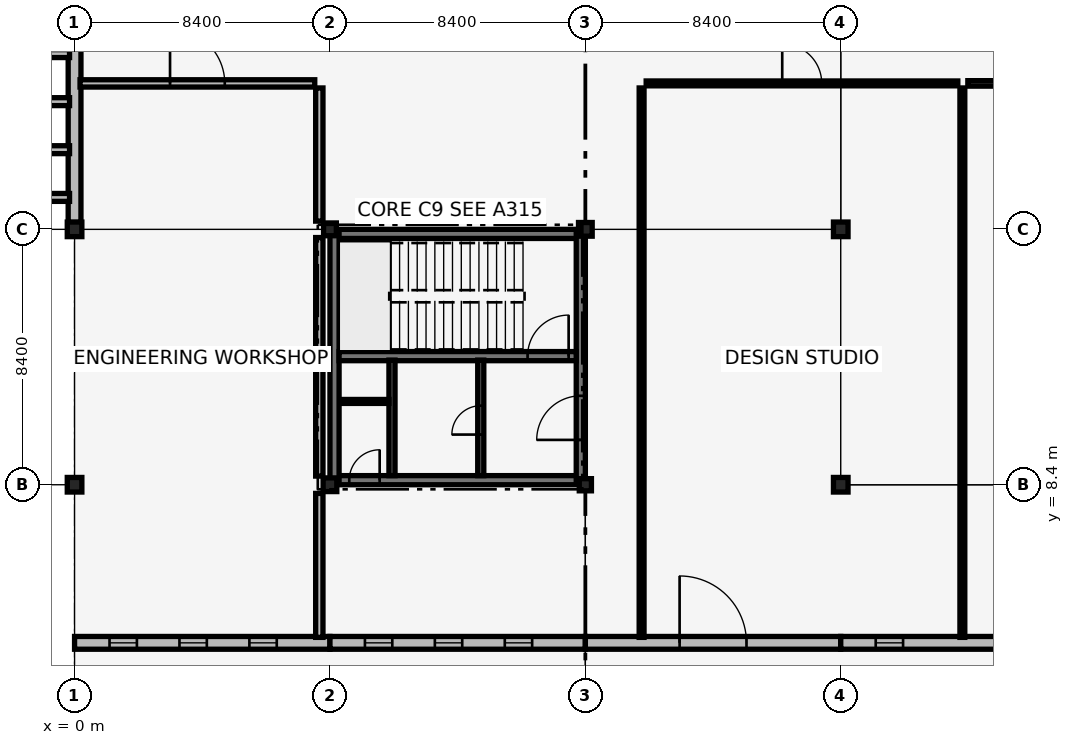
"""IFC4 building model, lengths in metres.
Left out: names, types, materials, properties, quantities, classifications, styles, units other than length and angle.
Written with IfcOpenShell. Run it as: python <this file> out.ifc"""

import sys

from ifc_helpers import new_model, si_unit, direction, frame, frame_2d, origin, origin_2d, place, context, subcontext, project, spatial, rectangle, extrude, element, fill, save


model = new_model("IFC4")
c1 = context("Model", 3, precision=1e-05, world=origin(), true_north=direction((0.0, 1.0)))
c2 = subcontext(c1, "Body", "Model", "MODEL_VIEW")
j1 = project(units=[si_unit("LENGTHUNIT", "METRE"), si_unit("PLANEANGLEUNIT", "RADIAN")], contexts=[c1])
p1 = place(None, origin())
s1 = spatial("IfcSite", under=j1, at=p1, CompositionType="ELEMENT")
p2 = place(p1, origin())
s2 = spatial("IfcBuilding", under=s1, at=p2, CompositionType="ELEMENT")
p3 = place(p2, origin())
s3 = spatial("IfcBuildingStorey", under=s2, at=p3, CompositionType="ELEMENT", Elevation=0.0)
p4 = place(p3, frame((8.55, 8.55, 0.0), z_axis=(0.0, 0.0, 1.0), x_axis=(1.0, 0.0, 0.0)))
e1 = element("IfcWall", 1, at=p4, inside=s3, PredefinedType="SHEAR", context=c2, shape_type="SweptSolid", body=[
    extrude(rectangle(XDim=8.1, YDim=0.3, at=frame_2d((4.05, 0.0))), origin(), (0.0, 0.0, 1.0), 5.14),
])
p5 = place(p4, frame((0.485, 0.0, 0.0)))
e2 = element("IfcOpeningElement", 2, at=p5, cuts=e1, PredefinedType="OPENING", context=c2, shape_type="SweptSolid", body=[
    extrude(rectangle(XDim=1.0, YDim=2.15, at=frame_2d((0.5, 1.075))), frame((0.0, 0.16, 0.0), z_axis=(0.0, -1.0, 0.0), x_axis=(1.0, 0.0, 0.0)), (0.0, 0.0, 1.0), 0.32),
])
for number, where, z_axis, x_axis in (
    (3, (8.55, 16.65, 0.0), (0.0, 0.0, 1.0), (1.0, 0.0, 0.0)),
    (4, (8.55, 8.55, 0.0), (0.0, 0.0, 1.0), (0.0, 1.0, 0.0)),
):
    element("IfcWall", number, at=place(p3, frame(where, z_axis=z_axis, x_axis=x_axis)), inside=s3, PredefinedType="SHEAR", context=c2, shape_type="SweptSolid", body=[
        extrude(rectangle(XDim=8.1, YDim=0.3, at=frame_2d((4.05, 0.0))), origin(), (0.0, 0.0, 1.0), 5.14),
    ])
p6 = place(p3, frame((16.65, 8.55, 0.0), z_axis=(0.0, 0.0, 1.0), x_axis=(0.0, 1.0, 0.0)))
e5 = element("IfcWall", 5, at=p6, inside=s3, PredefinedType="SHEAR", context=c2, shape_type="SweptSolid", body=[
    extrude(rectangle(XDim=8.1, YDim=0.3, at=frame_2d((4.05, 0.0))), origin(), (0.0, 0.0, 1.0), 5.14),
])
p7 = place(p6, frame((1.325, 0.0, 0.0)))
e6 = element("IfcOpeningElement", 6, at=p7, cuts=e5, PredefinedType="OPENING", context=c2, shape_type="SweptSolid", body=[
    extrude(rectangle(XDim=1.45, YDim=2.15, at=frame_2d((0.725, 1.075))), frame((0.0, 0.16, 0.0), z_axis=(0.0, -1.0, 0.0), x_axis=(1.0, 0.0, 0.0)), (0.0, 0.0, 1.0), 0.32),
])
p8 = place(p3, frame((8.7, 12.63, 0.0), z_axis=(0.0, 0.0, 1.0), x_axis=(1.0, 0.0, 0.0)))
e7 = element("IfcWall", 7, at=p8, inside=s3, PredefinedType="SHEAR", context=c2, shape_type="SweptSolid", body=[
    extrude(rectangle(XDim=7.8, YDim=0.3, at=frame_2d((3.9, 0.0))), origin(), (0.0, 0.0, 1.0), 5.14),
])
p9 = place(p8, frame((6.2, 0.0, 0.0)))
e8 = element("IfcOpeningElement", 8, at=p9, cuts=e7, PredefinedType="OPENING", context=c2, shape_type="SweptSolid", body=[
    extrude(rectangle(XDim=1.35, YDim=2.15, at=frame_2d((0.675, 1.075))), frame((0.0, 0.16, 0.0), z_axis=(0.0, -1.0, 0.0), x_axis=(1.0, 0.0, 0.0)), (0.0, 0.0, 1.0), 0.32),
])
for number, where, z_axis, x_axis in (
    (9, (0.0, 8.4, -0.32), (0.0, 0.0, 1.0), (1.0, 0.0, 0.0)),
    (10, (0.0, 16.8, -0.32), (0.0, 0.0, 1.0), (1.0, 0.0, 0.0)),
):
    element("IfcColumn", number, at=place(p3, frame(where, z_axis=z_axis, x_axis=x_axis)), inside=s3, PredefinedType="COLUMN", context=c2, shape_type="SweptSolid", body=[
        extrude(rectangle(XDim=0.48, YDim=0.48, at=origin_2d()), origin(), (0.0, 0.0, 1.0), 5.46),
    ])
p10 = place(p3, frame((8.4, 8.4, -0.32), z_axis=(0.0, 0.0, 1.0), x_axis=(1.0, 0.0, 0.0)))
e11 = element("IfcColumn", 11, at=p10, inside=s3, PredefinedType="COLUMN", context=c2, shape_type="SweptSolid", body=[
    extrude(rectangle(XDim=0.45, YDim=0.45, at=origin_2d()), origin(), (0.0, 0.0, 1.0), 5.46),
])
p11 = place(p3, frame((8.4, 16.8, -0.32), z_axis=(0.0, 0.0, 1.0), x_axis=(1.0, 0.0, 0.0)))
e12 = element("IfcColumn", 12, at=p11, inside=s3, PredefinedType="COLUMN", context=c2, shape_type="SweptSolid", body=[
    extrude(rectangle(XDim=0.42, YDim=0.42, at=origin_2d()), origin(), (0.0, 0.0, 1.0), 5.46),
])
p12 = place(p3, frame((16.8, 8.4, -0.32), z_axis=(0.0, 0.0, 1.0), x_axis=(1.0, 0.0, 0.0)))
e13 = element("IfcColumn", 13, at=p12, inside=s3, PredefinedType="COLUMN", context=c2, shape_type="SweptSolid", body=[
    extrude(rectangle(XDim=0.4, YDim=0.4, at=origin_2d()), origin(), (0.0, 0.0, 1.0), 5.46),
])
p13 = place(p3, frame((16.8, 16.8, -0.32), z_axis=(0.0, 0.0, 1.0), x_axis=(1.0, 0.0, 0.0)))
e14 = element("IfcColumn", 14, at=p13, inside=s3, PredefinedType="COLUMN", context=c2, shape_type="SweptSolid", body=[
    extrude(rectangle(XDim=0.45, YDim=0.45, at=origin_2d()), origin(), (0.0, 0.0, 1.0), 5.46),
])
for number, where, z_axis, x_axis in (
    (15, (25.2, 8.4, -0.32), (0.0, 0.0, 1.0), (1.0, 0.0, 0.0)),
    (16, (25.2, 16.8, -0.32), (0.0, 0.0, 1.0), (1.0, 0.0, 0.0)),
):
    element("IfcColumn", number, at=place(p3, frame(where, z_axis=z_axis, x_axis=x_axis)), inside=s3, PredefinedType="COLUMN", context=c2, shape_type="SweptSolid", body=[
        extrude(rectangle(XDim=0.48, YDim=0.48, at=origin_2d()), origin(), (0.0, 0.0, 1.0), 5.46),
    ])
p14 = place(p3, frame((0.0, 3.2, 0.0), z_axis=(0.0, 0.0, 1.0), x_axis=(1.0, 0.0, 0.0)))
e17 = element("IfcWall", 17, at=p14, inside=s3, PredefinedType="SOLIDWALL", context=c2, shape_type="SweptSolid", body=[
    extrude(rectangle(XDim=8.4, YDim=0.42, at=frame_2d((4.2, 0.0))), origin(), (0.0, 0.0, 1.0), 4.39),
])
p15 = place(p14, frame((1.15, 0.0, 0.85)))
e18 = element("IfcOpeningElement", 18, at=p15, cuts=e17, PredefinedType="OPENING", context=c2, shape_type="SweptSolid", body=[
    extrude(rectangle(XDim=0.9, YDim=3.0, at=frame_2d((0.45, 1.5))), frame((0.0, 0.22, 0.0), z_axis=(0.0, -1.0, 0.0), x_axis=(1.0, 0.0, 0.0)), (0.0, 0.0, 1.0), 0.44),
])
p16 = place(p14, frame((3.45, 0.0, 0.85)))
e19 = element("IfcOpeningElement", 19, at=p16, cuts=e17, PredefinedType="OPENING", context=c2, shape_type="SweptSolid", body=[
    extrude(rectangle(XDim=0.9, YDim=3.0, at=frame_2d((0.45, 1.5))), frame((0.0, 0.22, 0.0), z_axis=(0.0, -1.0, 0.0), x_axis=(1.0, 0.0, 0.0)), (0.0, 0.0, 1.0), 0.44),
])
p17 = place(p14, frame((5.75, 0.0, 0.85)))
e20 = element("IfcOpeningElement", 20, at=p17, cuts=e17, PredefinedType="OPENING", context=c2, shape_type="SweptSolid", body=[
    extrude(rectangle(XDim=0.9, YDim=3.0, at=frame_2d((0.45, 1.5))), frame((0.0, 0.22, 0.0), z_axis=(0.0, -1.0, 0.0), x_axis=(1.0, 0.0, 0.0)), (0.0, 0.0, 1.0), 0.44),
])
p18 = place(p3, frame((0.0, 17.025, 0.0), z_axis=(0.0, 0.0, 1.0), x_axis=(0.0, 1.0, 0.0)))
e21 = element("IfcWall", 21, at=p18, inside=s3, PredefinedType="SOLIDWALL", context=c2, shape_type="SweptSolid", body=[
    extrude(rectangle(XDim=7.74, YDim=0.42, at=frame_2d((3.87, 0.0))), origin(), (0.0, 0.0, 1.0), 4.39),
])
for number, where, z_axis, x_axis in (
    (22, (-0.165, 17.85, -0.25), (0.0, 0.0, 1.0), (-1.0, 0.0, 0.0)),
    (23, (-0.165, 19.42, -0.25), (0.0, 0.0, 1.0), (-1.0, 0.0, 0.0)),
    (24, (-0.165, 21.0, -0.25), (0.0, 0.0, 1.0), (-1.0, 0.0, 0.0)),
    (25, (-0.165, 22.58, -0.25), (0.0, 0.0, 1.0), (-1.0, 0.0, 0.0)),
):
    element("IfcWall", number, at=place(p3, frame(where, z_axis=z_axis, x_axis=x_axis)), inside=s3, PredefinedType="SOLIDWALL", context=c2, shape_type="SweptSolid", body=[
        extrude(rectangle(XDim=0.7, YDim=0.26, at=frame_2d((0.35, 0.0))), origin(), (0.0, 0.0, 1.0), 5.69),
    ])
p19 = place(p3, frame((8.4, 3.2, 0.0), z_axis=(0.0, 0.0, 1.0), x_axis=(1.0, 0.0, 0.0)))
e26 = element("IfcWall", 26, at=p19, inside=s3, PredefinedType="SOLIDWALL", context=c2, shape_type="SweptSolid", body=[
    extrude(rectangle(XDim=8.4, YDim=0.42, at=frame_2d((4.2, 0.0))), origin(), (0.0, 0.0, 1.0), 4.49),
])
p20 = place(p19, frame((1.15, 0.0, 0.85)))
e27 = element("IfcOpeningElement", 27, at=p20, cuts=e26, PredefinedType="OPENING", context=c2, shape_type="SweptSolid", body=[
    extrude(rectangle(XDim=0.9, YDim=3.0, at=frame_2d((0.45, 1.5))), frame((0.0, 0.22, 0.0), z_axis=(0.0, -1.0, 0.0), x_axis=(1.0, 0.0, 0.0)), (0.0, 0.0, 1.0), 0.44),
])
p21 = place(p19, frame((3.45, 0.0, 0.85)))
e28 = element("IfcOpeningElement", 28, at=p21, cuts=e26, PredefinedType="OPENING", context=c2, shape_type="SweptSolid", body=[
    extrude(rectangle(XDim=0.9, YDim=3.0, at=frame_2d((0.45, 1.5))), frame((0.0, 0.22, 0.0), z_axis=(0.0, -1.0, 0.0), x_axis=(1.0, 0.0, 0.0)), (0.0, 0.0, 1.0), 0.44),
])
p22 = place(p19, frame((5.75, 0.0, 0.85)))
e29 = element("IfcOpeningElement", 29, at=p22, cuts=e26, PredefinedType="OPENING", context=c2, shape_type="SweptSolid", body=[
    extrude(rectangle(XDim=0.9, YDim=3.0, at=frame_2d((0.45, 1.5))), frame((0.0, 0.22, 0.0), z_axis=(0.0, -1.0, 0.0), x_axis=(1.0, 0.0, 0.0)), (0.0, 0.0, 1.0), 0.44),
])
p23 = place(p3, frame((16.8, 3.2, 0.0), z_axis=(0.0, 0.0, 1.0), x_axis=(1.0, 0.0, 0.0)))
e30 = element("IfcWall", 30, at=p23, inside=s3, PredefinedType="SOLIDWALL", context=c2, shape_type="SweptSolid", body=[
    extrude(rectangle(XDim=8.4, YDim=0.42, at=frame_2d((4.2, 0.0))), origin(), (0.0, 0.0, 1.0), 4.49),
])
p24 = place(p23, frame((3.1, 0.0, 0.0)))
e31 = element("IfcOpeningElement", 31, at=p24, cuts=e30, PredefinedType="OPENING", context=c2, shape_type="SweptSolid", body=[
    extrude(rectangle(XDim=2.2, YDim=2.4, at=frame_2d((1.1, 1.2))), frame((0.0, 0.22, 0.0), z_axis=(0.0, -1.0, 0.0), x_axis=(1.0, 0.0, 0.0)), (0.0, 0.0, 1.0), 0.44),
])
p25 = place(p3, frame((25.2, 3.2, 0.0), z_axis=(0.0, 0.0, 1.0), x_axis=(1.0, 0.0, 0.0)))
e32 = element("IfcWall", 32, at=p25, inside=s3, PredefinedType="SOLIDWALL", context=c2, shape_type="SweptSolid", body=[
    extrude(rectangle(XDim=8.4, YDim=0.42, at=frame_2d((4.2, 0.0))), origin(), (0.0, 0.0, 1.0), 4.49),
])
p26 = place(p25, frame((1.15, 0.0, 0.85)))
e33 = element("IfcOpeningElement", 33, at=p26, cuts=e32, PredefinedType="OPENING", context=c2, shape_type="SweptSolid", body=[
    extrude(rectangle(XDim=0.9, YDim=3.0, at=frame_2d((0.45, 1.5))), frame((0.0, 0.22, 0.0), z_axis=(0.0, -1.0, 0.0), x_axis=(1.0, 0.0, 0.0)), (0.0, 0.0, 1.0), 0.44),
])
p27 = place(p25, frame((5.75, 0.0, 0.85)))
e34 = element("IfcOpeningElement", 34, at=p27, cuts=e32, PredefinedType="OPENING", context=c2, shape_type="SweptSolid", body=[
    extrude(rectangle(XDim=0.9, YDim=3.0, at=frame_2d((0.45, 1.5))), frame((0.0, 0.22, 0.0), z_axis=(0.0, -1.0, 0.0), x_axis=(1.0, 0.0, 0.0)), (0.0, 0.0, 1.0), 0.44),
])
p28 = place(p3, frame((13.36, 8.7, 0.0), z_axis=(0.0, 0.0, 1.0), x_axis=(0.0, 1.0, 0.0)))
e35 = element("IfcWall", 35, at=p28, inside=s3, PredefinedType="SHEAR", context=c2, shape_type="SweptSolid", body=[
    extrude(rectangle(XDim=3.8, YDim=0.2, at=frame_2d((1.9, 0.0))), origin(), (0.0, 0.0, 1.0), 4.46),
])
p29 = place(p28, frame((1.35, 0.0, 0.0)))
e36 = element("IfcOpeningElement", 36, at=p29, cuts=e35, PredefinedType="OPENING", context=c2, shape_type="SweptSolid", body=[
    extrude(rectangle(XDim=0.95, YDim=2.1, at=frame_2d((0.475, 1.05))), frame((0.0, 0.11, 0.0), z_axis=(0.0, -1.0, 0.0), x_axis=(1.0, 0.0, 0.0)), (0.0, 0.0, 1.0), 0.22),
])
p30 = place(p3, frame((10.44, 8.7, 0.0), z_axis=(0.0, 0.0, 1.0), x_axis=(0.0, 1.0, 0.0)))
e37 = element("IfcWall", 37, at=p30, inside=s3, PredefinedType="SHEAR", context=c2, shape_type="SweptSolid", body=[
    extrude(rectangle(XDim=3.8, YDim=0.2, at=frame_2d((1.9, 0.0))), origin(), (0.0, 0.0, 1.0), 4.46),
])
p31 = place(p3, frame((8.72, 11.14, 0.0), z_axis=(0.0, 0.0, 1.0), x_axis=(1.0, 0.0, 0.0)))
e38 = element("IfcWall", 38, at=p31, inside=s3, PredefinedType="PARTITIONING", context=c2, shape_type="SweptSolid", body=[
    extrude(rectangle(XDim=1.62, YDim=0.13, at=frame_2d((0.81, 0.0))), origin(), (0.0, 0.0, 1.0), 5.14),
])
p32 = place(p3, frame((0.18, 21.6, 0.0), z_axis=(0.0, 0.0, 1.0), x_axis=(1.0, 0.0, 0.0)))
e39 = element("IfcWall", 39, at=p32, inside=s3, PredefinedType="PARTITIONING", context=c2, shape_type="SweptSolid", body=[
    extrude(rectangle(XDim=7.72, YDim=0.24, at=frame_2d((3.86, 0.0))), origin(), (0.0, 0.0, 1.0), 4.39),
])
p33 = place(p32, frame((2.96, 0.0, 0.0)))
e40 = element("IfcOpeningElement", 40, at=p33, cuts=e39, PredefinedType="OPENING", context=c2, shape_type="SweptSolid", body=[
    extrude(rectangle(XDim=1.8, YDim=2.4, at=frame_2d((0.9, 1.2))), frame((0.0, 0.13, 0.0), z_axis=(0.0, -1.0, 0.0), x_axis=(1.0, 0.0, 0.0)), (0.0, 0.0, 1.0), 0.26),
])
p34 = place(p3, frame((8.05, 3.38, 0.0), z_axis=(0.0, 0.0, 1.0), x_axis=(0.0, 1.0, 0.0)))
e41 = element("IfcWall", 41, at=p34, inside=s3, PredefinedType="PARTITIONING", context=c2, shape_type="SweptSolid", body=[
    extrude(rectangle(XDim=4.735, YDim=0.24, at=frame_2d((2.368, 0.0))), origin(), (0.0, 0.0, 1.0), 4.46),
])
p35 = place(p3, frame((8.05, 8.685, 0.0), z_axis=(0.0, 0.0, 1.0), x_axis=(0.0, 1.0, 0.0)))
e42 = element("IfcWall", 42, at=p35, inside=s3, PredefinedType="PARTITIONING", context=c2, shape_type="SweptSolid", body=[
    extrude(rectangle(XDim=7.845, YDim=0.24, at=frame_2d((3.922, 0.0))), origin(), (0.0, 0.0, 1.0), 4.36),
])
p36 = place(p3, frame((8.05, 17.07, 0.0), z_axis=(0.0, 0.0, 1.0), x_axis=(0.0, 1.0, 0.0)))
e43 = element("IfcWall", 43, at=p36, inside=s3, PredefinedType="PARTITIONING", context=c2, shape_type="SweptSolid", body=[
    extrude(rectangle(XDim=4.38, YDim=0.24, at=frame_2d((2.19, 0.0))), origin(), (0.0, 0.0, 1.0), 4.36),
])
p37 = place(p3, frame((18.8, 21.6, 0.0), z_axis=(0.0, 0.0, 1.0), x_axis=(1.0, 0.0, 0.0)))
e44 = element("IfcWall", 44, at=p37, inside=s3, PredefinedType="PARTITIONING", context=c2, shape_type="SweptSolid", body=[
    extrude(rectangle(XDim=10.25, YDim=0.16, at=frame_2d((5.125, 0.0))), origin(), (0.0, 0.0, 1.0), 4.74),
])
p38 = place(p37, frame((4.475, 0.0, 0.0)))
e45 = element("IfcOpeningElement", 45, at=p38, cuts=e44, PredefinedType="OPENING", context=c2, shape_type="SweptSolid", body=[
    extrude(rectangle(XDim=1.3, YDim=2.2, at=frame_2d((0.65, 1.1))), frame((0.0, 0.09, 0.0), z_axis=(0.0, -1.0, 0.0), x_axis=(1.0, 0.0, 0.0)), (0.0, 0.0, 1.0), 0.18),
])
for number, where, z_axis, x_axis in (
    (46, (18.65, 3.38, 0.0), (0.0, 0.0, 1.0), (0.0, 1.0, 0.0)),
    (47, (29.2, 3.38, 0.0), (0.0, 0.0, 1.0), (0.0, 1.0, 0.0)),
):
    element("IfcWall", number, at=place(p3, frame(where, z_axis=z_axis, x_axis=x_axis)), inside=s3, PredefinedType="PARTITIONING", context=c2, shape_type="SweptSolid", body=[
        extrude(rectangle(XDim=18.07, YDim=0.16, at=frame_2d((9.035, 0.0))), origin(), (0.0, 0.0, 1.0), 4.36),
    ])
p39 = place(p3, frame((29.38, 21.6, 0.0), z_axis=(0.0, 0.0, 1.0), x_axis=(1.0, 0.0, 0.0)))
e48 = element("IfcWall", 48, at=p39, inside=s3, PredefinedType="PARTITIONING", context=c2, shape_type="SweptSolid", body=[
    extrude(rectangle(XDim=20.67, YDim=0.18, at=frame_2d((10.335, 0.0))), origin(), (0.0, 0.0, 1.0), 4.49),
])
p40 = place(p39, frame((9.685, 0.0, 0.0)))
e49 = element("IfcOpeningElement", 49, at=p40, cuts=e48, PredefinedType="OPENING", context=c2, shape_type="SweptSolid", body=[
    extrude(rectangle(XDim=1.3, YDim=2.2, at=frame_2d((0.65, 1.1))), frame((0.0, 0.1, 0.0), z_axis=(0.0, -1.0, 0.0), x_axis=(1.0, 0.0, 0.0)), (0.0, 0.0, 1.0), 0.2),
])
p41 = place(p15, origin())
e50 = element("IfcWindow", 50, at=p41, inside=s3, PartitioningType="DOUBLE_PANEL_VERTICAL", PredefinedType="WINDOW", context=c2, shape_type="SweptSolid", body=[
    extrude(rectangle(XDim=0.9, YDim=3.0, at=frame_2d((0.45, 1.5))), frame((0.0, 0.03, 0.0), z_axis=(0.0, -1.0, 0.0), x_axis=(1.0, 0.0, 0.0)), (0.0, 0.0, 1.0), 0.06),
])
fill(e18, e50)
p42 = place(p16, origin())
e51 = element("IfcWindow", 51, at=p42, inside=s3, PartitioningType="DOUBLE_PANEL_VERTICAL", PredefinedType="WINDOW", context=c2, shape_type="SweptSolid", body=[
    extrude(rectangle(XDim=0.9, YDim=3.0, at=frame_2d((0.45, 1.5))), frame((0.0, 0.03, 0.0), z_axis=(0.0, -1.0, 0.0), x_axis=(1.0, 0.0, 0.0)), (0.0, 0.0, 1.0), 0.06),
])
fill(e19, e51)
p43 = place(p17, origin())
e52 = element("IfcWindow", 52, at=p43, inside=s3, PartitioningType="DOUBLE_PANEL_VERTICAL", PredefinedType="WINDOW", context=c2, shape_type="SweptSolid", body=[
    extrude(rectangle(XDim=0.9, YDim=3.0, at=frame_2d((0.45, 1.5))), frame((0.0, 0.03, 0.0), z_axis=(0.0, -1.0, 0.0), x_axis=(1.0, 0.0, 0.0)), (0.0, 0.0, 1.0), 0.06),
])
fill(e20, e52)
p44 = place(p20, origin())
e53 = element("IfcWindow", 53, at=p44, inside=s3, PartitioningType="DOUBLE_PANEL_VERTICAL", PredefinedType="WINDOW", context=c2, shape_type="SweptSolid", body=[
    extrude(rectangle(XDim=0.9, YDim=3.0, at=frame_2d((0.45, 1.5))), frame((0.0, 0.03, 0.0), z_axis=(0.0, -1.0, 0.0), x_axis=(1.0, 0.0, 0.0)), (0.0, 0.0, 1.0), 0.06),
])
fill(e27, e53)
p45 = place(p21, origin())
e54 = element("IfcWindow", 54, at=p45, inside=s3, PartitioningType="DOUBLE_PANEL_VERTICAL", PredefinedType="WINDOW", context=c2, shape_type="SweptSolid", body=[
    extrude(rectangle(XDim=0.9, YDim=3.0, at=frame_2d((0.45, 1.5))), frame((0.0, 0.03, 0.0), z_axis=(0.0, -1.0, 0.0), x_axis=(1.0, 0.0, 0.0)), (0.0, 0.0, 1.0), 0.06),
])
fill(e28, e54)
p46 = place(p22, origin())
e55 = element("IfcWindow", 55, at=p46, inside=s3, PartitioningType="DOUBLE_PANEL_VERTICAL", PredefinedType="WINDOW", context=c2, shape_type="SweptSolid", body=[
    extrude(rectangle(XDim=0.9, YDim=3.0, at=frame_2d((0.45, 1.5))), frame((0.0, 0.03, 0.0), z_axis=(0.0, -1.0, 0.0), x_axis=(1.0, 0.0, 0.0)), (0.0, 0.0, 1.0), 0.06),
])
fill(e29, e55)
p47 = place(p24, origin())
e56 = element("IfcDoor", 56, at=p47, inside=s3, OperationType="DOUBLE_DOOR_SINGLE_SWING", PredefinedType="DOOR", context=c2, shape_type="SweptSolid", body=[
    extrude(rectangle(XDim=2.2, YDim=2.4, at=frame_2d((1.1, 1.2))), frame((0.0, 0.025, 0.0), z_axis=(0.0, -1.0, 0.0), x_axis=(1.0, 0.0, 0.0)), (0.0, 0.0, 1.0), 0.05),
])
fill(e31, e56)
p48 = place(p26, origin())
e57 = element("IfcWindow", 57, at=p48, inside=s3, PartitioningType="DOUBLE_PANEL_VERTICAL", PredefinedType="WINDOW", context=c2, shape_type="SweptSolid", body=[
    extrude(rectangle(XDim=0.9, YDim=3.0, at=frame_2d((0.45, 1.5))), frame((0.0, 0.03, 0.0), z_axis=(0.0, -1.0, 0.0), x_axis=(1.0, 0.0, 0.0)), (0.0, 0.0, 1.0), 0.06),
])
fill(e33, e57)
p49 = place(p9, origin())
e58 = element("IfcDoor", 58, at=p49, inside=s3, OperationType="SINGLE_SWING_RIGHT", PredefinedType="DOOR", context=c2, shape_type="SweptSolid", body=[
    extrude(rectangle(XDim=1.35, YDim=2.15, at=frame_2d((0.675, 1.075))), frame((0.0, 0.025, 0.0), z_axis=(0.0, -1.0, 0.0), x_axis=(1.0, 0.0, 0.0)), (0.0, 0.0, 1.0), 0.05),
])
fill(e8, e58)
p50 = place(p29, origin())
e59 = element("IfcDoor", 59, at=p50, inside=s3, OperationType="SINGLE_SWING_LEFT", PredefinedType="DOOR", context=c2, shape_type="SweptSolid", body=[
    extrude(rectangle(XDim=0.95, YDim=2.1, at=frame_2d((0.475, 1.05))), frame((0.0, 0.025, 0.0), z_axis=(0.0, -1.0, 0.0), x_axis=(1.0, 0.0, 0.0)), (0.0, 0.0, 1.0), 0.05),
])
fill(e36, e59)
p51 = place(p7, origin())
e60 = element("IfcDoor", 60, at=p51, inside=s3, OperationType="DOUBLE_DOOR_SINGLE_SWING", PredefinedType="DOOR", context=c2, shape_type="SweptSolid", body=[
    extrude(rectangle(XDim=1.45, YDim=2.15, at=frame_2d((0.725, 1.075))), frame((0.0, 0.025, 0.0), z_axis=(0.0, -1.0, 0.0), x_axis=(1.0, 0.0, 0.0)), (0.0, 0.0, 1.0), 0.05),
])
fill(e6, e60)
p52 = place(p5, origin())
e61 = element("IfcDoor", 61, at=p52, inside=s3, OperationType="SINGLE_SWING_RIGHT", PredefinedType="DOOR", context=c2, shape_type="SweptSolid", body=[
    extrude(rectangle(XDim=1.0, YDim=2.15, at=frame_2d((0.5, 1.075))), frame((0.0, 0.025, 0.0), z_axis=(0.0, -1.0, 0.0), x_axis=(1.0, 0.0, 0.0)), (0.0, 0.0, 1.0), 0.05),
])
fill(e2, e61)
p53 = place(p33, origin())
e62 = element("IfcDoor", 62, at=p53, inside=s3, OperationType="DOUBLE_DOOR_SINGLE_SWING", PredefinedType="DOOR", context=c2, shape_type="SweptSolid", body=[
    extrude(rectangle(XDim=1.8, YDim=2.4, at=frame_2d((0.9, 1.2))), frame((0.0, 0.025, 0.0), z_axis=(0.0, -1.0, 0.0), x_axis=(1.0, 0.0, 0.0)), (0.0, 0.0, 1.0), 0.05),
])
fill(e40, e62)
p54 = place(p38, origin())
e63 = element("IfcDoor", 63, at=p54, inside=s3, OperationType="SINGLE_SWING_LEFT", PredefinedType="DOOR", context=c2, shape_type="SweptSolid", body=[
    extrude(rectangle(XDim=1.3, YDim=2.2, at=frame_2d((0.65, 1.1))), frame((0.0, 0.025, 0.0), z_axis=(0.0, -1.0, 0.0), x_axis=(1.0, 0.0, 0.0)), (0.0, 0.0, 1.0), 0.05),
])
fill(e45, e63)
save(model, sys.argv[1])
